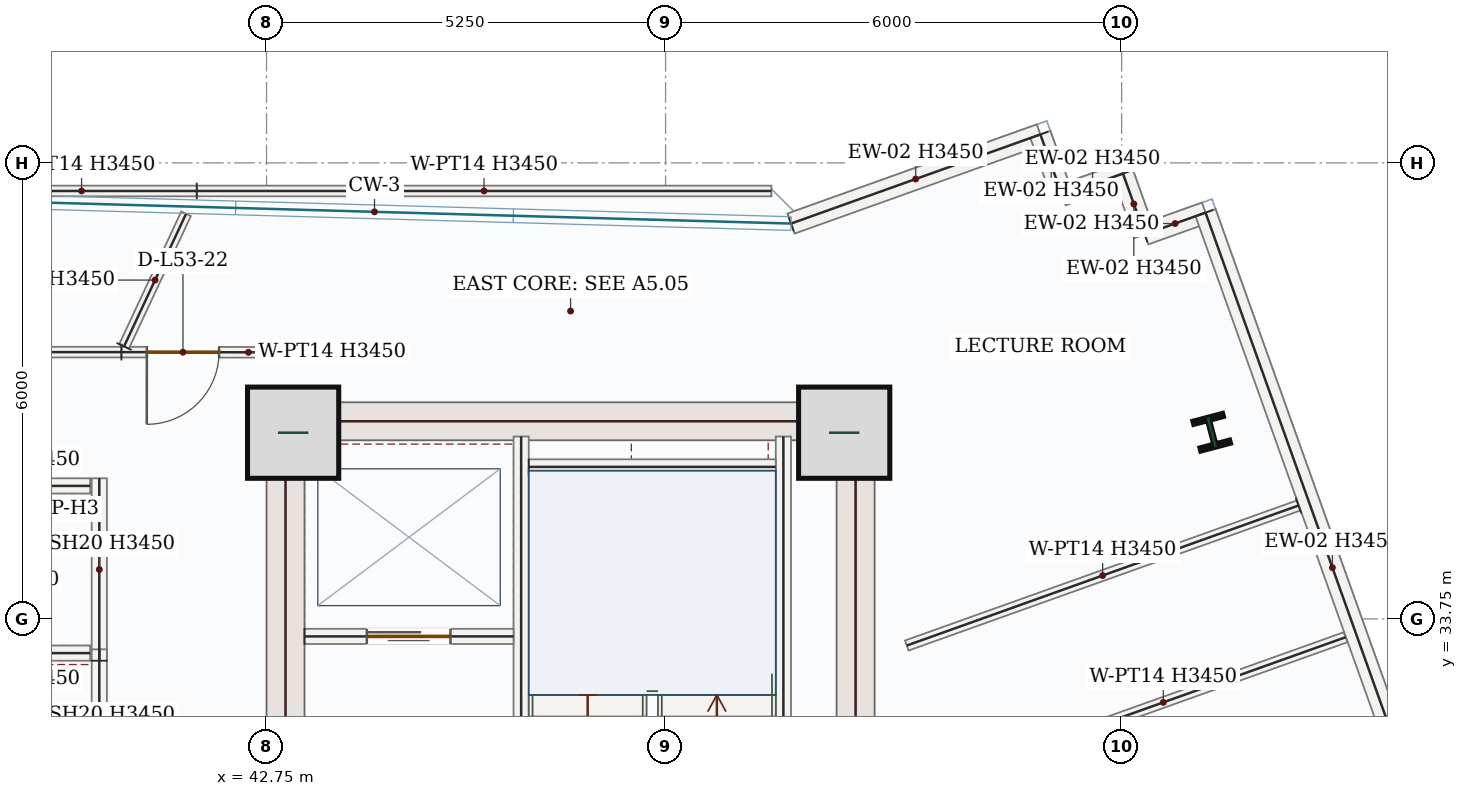
"""IFC4 building model, lengths in metres.
Left out: names, types, materials, properties, quantities, classifications, styles, units other than length and angle.
Written with IfcOpenShell. Run it as: python <this file> out.ifc"""

import sys

from ifc_helpers import new_model, si_unit, direction, frame, frame_2d, origin, origin_2d, place, context, subcontext, project, spatial, rectangle, i_section, extrude, source, transform, mapped, element, fill, save


model = new_model("IFC4")
c1 = context("Model", 3, precision=1e-05, world=origin(), true_north=direction((0.0, 1.0)))
c2 = subcontext(c1, "Body", "Model", "MODEL_VIEW")
j1 = project(units=[si_unit("LENGTHUNIT", "METRE"), si_unit("PLANEANGLEUNIT", "RADIAN")], contexts=[c1])
p1 = place(None, origin())
s1 = spatial("IfcSite", under=j1, at=p1, CompositionType="ELEMENT")
p2 = place(p1, origin())
s2 = spatial("IfcBuilding", under=s1, at=p2, CompositionType="ELEMENT")
p3 = place(p2, frame((0.0, 0.0, 225.3)))
s3 = spatial("IfcBuildingStorey", under=s2, at=p3, CompositionType="ELEMENT", Elevation=225.3)
p4 = place(p3, frame((43.0, 28.05, 0.0), z_axis=(0.0, 0.0, 1.0), x_axis=(0.0, 1.0, 0.0)))
e1 = element("IfcWall", 1, at=p4, inside=s3, PredefinedType="SHEAR", context=c2, shape_type="SweptSolid", body=[
    extrude(rectangle(XDim=8.55, YDim=0.5, at=frame_2d((4.275, 0.0))), origin(), (0.0, 0.0, 1.0), 3.45),
])
p5 = place(p4, frame((1.5, 0.0, 0.0)))
e2 = element("IfcOpeningElement", 2, at=p5, cuts=e1, PredefinedType="OPENING", context=c2, shape_type="SweptSolid", body=[
    extrude(rectangle(XDim=1.1, YDim=2.2, at=frame_2d((0.55, 1.1))), frame((0.0, 0.26, 0.0), z_axis=(0.0, -1.0, 0.0), x_axis=(1.0, 0.0, 0.0)), (0.0, 0.0, 1.0), 0.52),
])
m1 = source(origin(), c2, "Body", "SweptSolid", [
    extrude(rectangle(XDim=8.55, YDim=0.5, at=frame_2d((4.275, 0.0))), origin(), (0.0, 0.0, 1.0), 3.45),
])
p6 = place(p3, frame((50.5, 28.05, 0.0), z_axis=(0.0, 0.0, 1.0), x_axis=(0.0, 1.0, 0.0)))
e3 = element("IfcWall", 3, at=p6, inside=s3, PredefinedType="SHEAR", context=c2, shape_type="MappedRepresentation", body=[
    mapped(m1, transform((0.0, 0.0, 0.0), x_axis=(1.0, 0.0, 0.0), y_axis=(0.0, 1.0, 0.0), z_axis=(0.0, 0.0, 1.0), scale=1.0)),
])
m2 = source(origin(), c2, "Body", "SweptSolid", [
    extrude(rectangle(XDim=7.0, YDim=0.5, at=frame_2d((3.5, 0.0))), origin(), (0.0, 0.0, 1.0), 3.45),
])
p7 = place(p3, frame((43.25, 36.35, 0.0), z_axis=(0.0, 0.0, 1.0), x_axis=(1.0, 0.0, 0.0)))
e4 = element("IfcWall", 4, at=p7, inside=s3, PredefinedType="SHEAR", context=c2, shape_type="MappedRepresentation", body=[
    mapped(m2, transform((0.0, 0.0, 0.0), x_axis=(1.0, 0.0, 0.0), y_axis=(0.0, 1.0, 0.0), z_axis=(0.0, 0.0, 1.0), scale=1.0)),
])
m3 = source(origin(), c2, "Body", "SweptSolid", [
    extrude(rectangle(XDim=1.2, YDim=1.2, at=origin_2d()), origin(), (0.0, 0.0, 1.0), 3.9),
])
for number, where, z_axis, x_axis in (
    (5, (43.1, 36.2, 0.0), (0.0, 0.0, 1.0), (1.0, 0.0, 0.0)),
    (6, (50.35, 36.2, 0.0), (0.0, 0.0, 1.0), (1.0, 0.0, 0.0)),
):
    element("IfcColumn", number, at=place(p3, frame(where, z_axis=z_axis, x_axis=x_axis)), inside=s3, PredefinedType="COLUMN", context=c2, shape_type="MappedRepresentation", body=[
        mapped(m3, transform((0.0, 0.0, 0.0), x_axis=(1.0, 0.0, 0.0), y_axis=(0.0, 1.0, 0.0), z_axis=(0.0, 0.0, 1.0), scale=1.0)),
    ])
m4 = source(origin(), c2, "Body", "SweptSolid", [
    extrude(i_section(OverallWidth=0.404, OverallDepth=0.407, WebThickness=0.027, FlangeThickness=0.044, FilletRadius=0.018, at=origin_2d()), origin(), (0.0, 0.0, 1.0), 3.9),
])
p8 = place(p3, frame((55.185, 36.206, 0.0), z_axis=(0.0, 0.0, 1.0), x_axis=(0.966823388604, 0.255445757936, 0.0)))
e7 = element("IfcColumn", 7, at=p8, inside=s3, PredefinedType="COLUMN", context=c2, shape_type="MappedRepresentation", body=[
    mapped(m4, transform((0.0, 0.0, 0.0), x_axis=(1.0, 0.0, 0.0), y_axis=(0.0, 1.0, 0.0), z_axis=(0.0, 0.0, 1.0), scale=1.0)),
])
m5 = source(origin(), c2, "Body", "SweptSolid", [
    extrude(rectangle(XDim=3.483, YDim=0.28, at=frame_2d((1.742, 0.0))), origin(), (0.0, 0.0, 1.0), 3.45),
])
p9 = place(p3, frame((49.651, 38.951, 0.0), z_axis=(0.0, 0.0, 1.0), x_axis=(0.941665776774, 0.336549498368, 0.0)))
e8 = element("IfcWall", 8, at=p9, inside=s3, PredefinedType="SOLIDWALL", context=c2, shape_type="MappedRepresentation", body=[
    mapped(m5, transform((0.0, 0.0, 0.0), x_axis=(1.0, 0.0, 0.0), y_axis=(0.0, 1.0, 0.0), z_axis=(0.0, 0.0, 1.0), scale=1.0)),
])
m6 = source(origin(), c2, "Body", "SweptSolid", [
    extrude(rectangle(XDim=0.85, YDim=0.28, at=frame_2d((0.425, 0.0))), origin(), (0.0, 0.0, 1.0), 3.45),
])
p10 = place(p3, frame((52.931, 40.124, 0.0), z_axis=(0.0, 0.0, 1.0), x_axis=(0.336481891926, -0.941689936447, 0.0)))
e9 = element("IfcWall", 9, at=p10, inside=s3, PredefinedType="SOLIDWALL", context=c2, shape_type="MappedRepresentation", body=[
    mapped(m6, transform((0.0, 0.0, 0.0), x_axis=(1.0, 0.0, 0.0), y_axis=(0.0, 1.0, 0.0), z_axis=(0.0, 0.0, 1.0), scale=1.0)),
])
m7 = source(origin(), c2, "Body", "SweptSolid", [
    extrude(rectangle(XDim=0.85, YDim=0.28, at=frame_2d((0.425, 0.0))), origin(), (0.0, 0.0, 1.0), 3.45),
])
for number, where, z_axis, x_axis in (
    (10, (53.217, 39.323, 0.0), (0.0, 0.0, 1.0), (0.942, 0.337, 0.0)),
    (11, (54.017, 39.609, 0.0), (0.0, 0.0, 1.0), (0.337, -0.942, 0.0)),
):
    element("IfcWall", number, at=place(p3, frame(where, z_axis=z_axis, x_axis=x_axis)), inside=s3, PredefinedType="SOLIDWALL", context=c2, shape_type="MappedRepresentation", body=[
        mapped(m7, transform((0.0, 0.0, 0.0), x_axis=(1.0, 0.0, 0.0), y_axis=(0.0, 1.0, 0.0), z_axis=(0.0, 0.0, 1.0), scale=1.0)),
    ])
m8 = source(origin(), c2, "Body", "SweptSolid", [
    extrude(rectangle(XDim=0.85, YDim=0.28, at=frame_2d((0.425, 0.0))), origin(), (0.0, 0.0, 1.0), 3.45),
])
p11 = place(p3, frame((54.303, 38.809, 0.0), z_axis=(0.0, 0.0, 1.0), x_axis=(0.941657417713, 0.336572886112, 0.0)))
e12 = element("IfcWall", 12, at=p11, inside=s3, PredefinedType="SOLIDWALL", context=c2, shape_type="MappedRepresentation", body=[
    mapped(m8, transform((0.0, 0.0, 0.0), x_axis=(1.0, 0.0, 0.0), y_axis=(0.0, 1.0, 0.0), z_axis=(0.0, 0.0, 1.0), scale=1.0)),
])
m9 = source(origin(), c2, "Body", "SweptSolid", [
    extrude(rectangle(XDim=9.92, YDim=0.28, at=frame_2d((4.96, 0.0))), origin(), (0.0, 0.0, 1.0), 3.45),
])
p12 = place(p3, frame((55.104, 39.095, 0.0), z_axis=(0.0, 0.0, 1.0), x_axis=(0.336532833412, -0.941671732631, 0.0)))
e13 = element("IfcWall", 13, at=p12, inside=s3, PredefinedType="SOLIDWALL", context=c2, shape_type="MappedRepresentation", body=[
    mapped(m9, transform((0.0, 0.0, 0.0), x_axis=(1.0, 0.0, 0.0), y_axis=(0.0, 1.0, 0.0), z_axis=(0.0, 0.0, 1.0), scale=1.0)),
])
m10 = source(origin(), c2, "Body", "SweptSolid", [
    extrude(rectangle(XDim=7.87, YDim=0.2, at=frame_2d((3.935, 0.0))), origin(), (0.0, 0.0, 1.0), 3.45),
])
p13 = place(p3, frame((49.55, 28.28, 0.0), z_axis=(0.0, 0.0, 1.0), x_axis=(0.0, 1.0, 0.0)))
e14 = element("IfcWall", 14, at=p13, inside=s3, PredefinedType="SOLIDWALL", context=c2, shape_type="MappedRepresentation", body=[
    mapped(m10, transform((0.0, 0.0, 0.0), x_axis=(1.0, 0.0, 0.0), y_axis=(0.0, 1.0, 0.0), z_axis=(0.0, 0.0, 1.0), scale=1.0)),
])
p14 = place(p3, frame((46.1, 28.15, 0.0), z_axis=(0.0, 0.0, 1.0), x_axis=(0.0, 1.0, 0.0)))
e15 = element("IfcWall", 15, at=p14, inside=s3, PredefinedType="SOLIDWALL", context=c2, shape_type="SweptSolid", body=[
    extrude(rectangle(XDim=8.0, YDim=0.2, at=frame_2d((4.0, 0.0))), origin(), (0.0, 0.0, 1.0), 3.45),
])
p15 = place(p14, frame((0.4, 0.0, 0.0)))
e16 = element("IfcOpeningElement", 16, at=p15, cuts=e15, PredefinedType="OPENING", context=c2, shape_type="SweptSolid", body=[
    extrude(rectangle(XDim=1.05, YDim=2.15, at=frame_2d((0.525, 1.075))), frame((0.0, 0.11, 0.0), z_axis=(0.0, -1.0, 0.0), x_axis=(1.0, 0.0, 0.0)), (0.0, 0.0, 1.0), 0.22),
])
m11 = source(origin(), c2, "Body", "SweptSolid", [
    extrude(rectangle(XDim=3.25, YDim=0.2, at=frame_2d((1.625, 0.0))), origin(), (0.0, 0.0, 1.0), 3.45),
])
p16 = place(p3, frame((46.2, 35.75, 0.0), z_axis=(0.0, 0.0, 1.0), x_axis=(1.0, 0.0, 0.0)))
e17 = element("IfcWall", 17, at=p16, inside=s3, PredefinedType="SOLIDWALL", context=c2, shape_type="MappedRepresentation", body=[
    mapped(m11, transform((0.0, 0.0, 0.0), x_axis=(1.0, 0.0, 0.0), y_axis=(0.0, 1.0, 0.0), z_axis=(0.0, 0.0, 1.0), scale=1.0)),
])
p17 = place(p3, frame((43.25, 33.52, 0.0), z_axis=(0.0, 0.0, 1.0), x_axis=(1.0, 0.0, 0.0)))
e18 = element("IfcWall", 18, at=p17, inside=s3, PredefinedType="SOLIDWALL", context=c2, shape_type="SweptSolid", body=[
    extrude(rectangle(XDim=2.75, YDim=0.2, at=frame_2d((1.375, 0.0))), origin(), (0.0, 0.0, 1.0), 3.45),
])
p18 = place(p17, frame((0.82, 0.0, 0.0)))
e19 = element("IfcOpeningElement", 19, at=p18, cuts=e18, PredefinedType="OPENING", context=c2, shape_type="SweptSolid", body=[
    extrude(rectangle(XDim=1.1, YDim=2.15, at=frame_2d((0.55, 1.075))), frame((0.0, 0.11, 0.0), z_axis=(0.0, -1.0, 0.0), x_axis=(1.0, 0.0, 0.0)), (0.0, 0.0, 1.0), 0.22),
])
m12 = source(origin(), c2, "Body", "SweptSolid", [
    extrude(rectangle(XDim=2.4, YDim=0.2, at=frame_2d((1.2, 0.0))), origin(), (0.0, 0.0, 1.0), 3.45),
])
p19 = place(p3, frame((40.55, 33.2, 0.0), z_axis=(0.0, 0.0, 1.0), x_axis=(0.0, 1.0, 0.0)))
e20 = element("IfcWall", 20, at=p19, inside=s3, PredefinedType="SOLIDWALL", context=c2, shape_type="MappedRepresentation", body=[
    mapped(m12, transform((0.0, 0.0, 0.0), x_axis=(1.0, 0.0, 0.0), y_axis=(0.0, 1.0, 0.0), z_axis=(0.0, 0.0, 1.0), scale=1.0)),
])
m13 = source(origin(), c2, "Body", "SweptSolid", [
    extrude(rectangle(XDim=2.26, YDim=0.2, at=frame_2d((1.13, 0.0))), origin(), (0.0, 0.0, 1.0), 3.45),
])
for number, where, z_axis, x_axis in (
    (21, (38.17, 33.3, 0.0), (0.0, 0.0, 1.0), (1.0, 0.0, 0.0)),
    (22, (38.17, 35.5, 0.0), (0.0, 0.0, 1.0), (1.0, 0.0, 0.0)),
):
    element("IfcWall", number, at=place(p3, frame(where, z_axis=z_axis, x_axis=x_axis)), inside=s3, PredefinedType="SOLIDWALL", context=c2, shape_type="MappedRepresentation", body=[
        mapped(m13, transform((0.0, 0.0, 0.0), x_axis=(1.0, 0.0, 0.0), y_axis=(0.0, 1.0, 0.0), z_axis=(0.0, 0.0, 1.0), scale=1.0)),
    ])
p20 = place(p3, frame((40.55, 30.95, 0.0), z_axis=(0.0, 0.0, 1.0), x_axis=(0.0, 1.0, 0.0)))
e23 = element("IfcWall", 23, at=p20, inside=s3, PredefinedType="SOLIDWALL", context=c2, shape_type="MappedRepresentation", body=[
    mapped(m12, transform((0.0, 0.0, 0.0), x_axis=(1.0, 0.0, 0.0), y_axis=(0.0, 1.0, 0.0), z_axis=(0.0, 0.0, 1.0), scale=1.0)),
])
m14 = source(origin(), c2, "Body", "SweptSolid", [
    extrude(rectangle(XDim=5.093, YDim=0.14, at=frame_2d((2.547, 0.0))), origin(), (0.0, 0.0, 1.0), 3.45),
])
p21 = place(p3, frame((52.15, 31.795, 0.0), z_axis=(0.0, 0.0, 1.0), x_axis=(0.941667058904, 0.336545910947, 0.0)))
e24 = element("IfcWall", 24, at=p21, inside=s3, PredefinedType="PARTITIONING", context=c2, shape_type="MappedRepresentation", body=[
    mapped(m14, transform((0.0, 0.0, 0.0), x_axis=(1.0, 0.0, 0.0), y_axis=(0.0, 1.0, 0.0), z_axis=(0.0, 0.0, 1.0), scale=1.0)),
])
p22 = place(p3, frame((42.748, 37.257, 0.0), z_axis=(0.0, 0.0, 1.0), x_axis=(-0.999999008896, 0.001407908498, 0.0)))
e25 = element("IfcWall", 25, at=p22, inside=s3, PredefinedType="PARTITIONING", context=c2, shape_type="SweptSolid", body=[
    extrude(rectangle(XDim=1.907, YDim=0.14, at=frame_2d((0.954, 0.0))), origin(), (0.0, 0.0, 1.0), 3.45),
])
p23 = place(p22, frame((0.622, 0.0, 0.0)))
e26 = element("IfcOpeningElement", 26, at=p23, cuts=e25, PredefinedType="OPENING", context=c2, shape_type="SweptSolid", body=[
    extrude(rectangle(XDim=0.95, YDim=2.15, at=frame_2d((0.475, 1.075))), frame((0.0, 0.08, 0.0), z_axis=(0.0, -1.0, 0.0), x_axis=(1.0, 0.0, 0.0)), (0.0, 0.0, 1.0), 0.16),
])
m15 = source(origin(), c2, "Body", "SweptSolid", [
    extrude(rectangle(XDim=1.927, YDim=0.14, at=frame_2d((0.963, 0.0))), origin(), (0.0, 0.0, 1.0), 3.45),
])
p24 = place(p3, frame((40.876, 37.335, 0.0), z_axis=(0.0, 0.0, 1.0), x_axis=(0.42364150529, 0.905829937127, 0.0)))
e27 = element("IfcWall", 27, at=p24, inside=s3, PredefinedType="PARTITIONING", context=c2, shape_type="MappedRepresentation", body=[
    mapped(m15, transform((0.0, 0.0, 0.0), x_axis=(1.0, 0.0, 0.0), y_axis=(0.0, 1.0, 0.0), z_axis=(0.0, 0.0, 1.0), scale=1.0)),
])
m16 = source(origin(), c2, "Body", "SweptSolid", [
    extrude(rectangle(XDim=7.56, YDim=0.14, at=frame_2d((3.78, 0.0))), origin(), (0.0, 0.0, 1.0), 3.45),
])
p25 = place(p3, frame((41.832, 39.38, 0.0), z_axis=(0.0, 0.0, 1.0), x_axis=(1.0, 0.0, 0.0)))
e28 = element("IfcWall", 28, at=p25, inside=s3, PredefinedType="PARTITIONING", context=c2, shape_type="MappedRepresentation", body=[
    mapped(m16, transform((0.0, 0.0, 0.0), x_axis=(1.0, 0.0, 0.0), y_axis=(0.0, 1.0, 0.0), z_axis=(0.0, 0.0, 1.0), scale=1.0)),
])
m17 = source(origin(), c2, "Body", "SweptSolid", [
    extrude(rectangle(XDim=5.473, YDim=0.14, at=frame_2d((2.736, 0.0))), origin(), (0.0, 0.0, 1.0), 3.45),
])
p26 = place(p3, frame((56.327, 35.242, 0.0), z_axis=(0.0, 0.0, 1.0), x_axis=(-0.941665179086, -0.336551170695, 0.0)))
e29 = element("IfcWall", 29, at=p26, inside=s3, PredefinedType="PARTITIONING", context=c2, shape_type="MappedRepresentation", body=[
    mapped(m17, transform((0.0, 0.0, 0.0), x_axis=(1.0, 0.0, 0.0), y_axis=(0.0, 1.0, 0.0), z_axis=(0.0, 0.0, 1.0), scale=1.0)),
])
p27 = place(p3, frame((40.841, 37.26, 0.0), z_axis=(0.0, 0.0, 1.0), x_axis=(-1.0, 0.0, 0.0)))
e30 = element("IfcWall", 30, at=p27, inside=s3, PredefinedType="PARTITIONING", context=c2, shape_type="SweptSolid", body=[
    extrude(rectangle(XDim=7.573, YDim=0.14, at=frame_2d((3.787, 0.0))), origin(), (0.0, 0.0, 1.0), 3.45),
])
p28 = place(p27, frame((4.305, 0.0, 0.0)))
e31 = element("IfcOpeningElement", 31, at=p28, cuts=e30, PredefinedType="OPENING", context=c2, shape_type="SweptSolid", body=[
    extrude(rectangle(XDim=0.95, YDim=2.15, at=frame_2d((0.475, 1.075))), frame((0.0, 0.08, 0.0), z_axis=(0.0, -1.0, 0.0), x_axis=(1.0, 0.0, 0.0)), (0.0, 0.0, 1.0), 0.16),
])
m18 = source(origin(), c2, "Body", "SweptSolid", [
    extrude(rectangle(XDim=3.03, YDim=0.14, at=frame_2d((1.515, 0.0))), origin(), (0.0, 0.0, 1.0), 3.45),
])
p29 = place(p3, frame((38.802, 39.38, 0.0), z_axis=(0.0, 0.0, 1.0), x_axis=(1.0, 0.0, 0.0)))
e32 = element("IfcWall", 32, at=p29, inside=s3, PredefinedType="PARTITIONING", context=c2, shape_type="MappedRepresentation", body=[
    mapped(m18, transform((0.0, 0.0, 0.0), x_axis=(1.0, 0.0, 0.0), y_axis=(0.0, 1.0, 0.0), z_axis=(0.0, 0.0, 1.0), scale=1.0)),
])
m19 = source(origin(), c2, "Body", "SweptSolid", [
    extrude(rectangle(XDim=1.1, YDim=2.15, at=frame_2d((0.55, 1.075))), frame((0.0, 0.025, 0.0), z_axis=(0.0, -1.0, 0.0), x_axis=(1.0, 0.0, 0.0)), (0.0, 0.0, 1.0), 0.05),
])
p30 = place(p18, origin())
e33 = element("IfcDoor", 33, at=p30, inside=s3, OperationType="DOUBLE_DOOR_SLIDING", PredefinedType="DOOR", context=c2, shape_type="MappedRepresentation", body=[
    mapped(m19, transform((0.0, 0.0, 0.0), x_axis=(1.0, 0.0, 0.0), y_axis=(0.0, 1.0, 0.0), z_axis=(0.0, 0.0, 1.0), scale=1.0)),
])
fill(e19, e33)
m20 = source(origin(), c2, "Body", "SweptSolid", [
    extrude(rectangle(XDim=0.95, YDim=2.15, at=frame_2d((0.475, 1.075))), frame((0.0, 0.025, 0.0), z_axis=(0.0, -1.0, 0.0), x_axis=(1.0, 0.0, 0.0)), (0.0, 0.0, 1.0), 0.05),
])
p31 = place(p23, origin())
e34 = element("IfcDoor", 34, at=p31, inside=s3, OperationType="SINGLE_SWING_RIGHT", PredefinedType="DOOR", context=c2, shape_type="MappedRepresentation", body=[
    mapped(m20, transform((0.0, 0.0, 0.0), x_axis=(1.0, 0.0, 0.0), y_axis=(0.0, 1.0, 0.0), z_axis=(0.0, 0.0, 1.0), scale=1.0)),
])
fill(e26, e34)
save(model, sys.argv[1])
